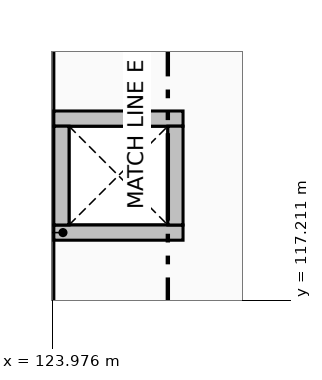
"""IFC4 building model, lengths in metres.
Left out: names, types, materials, properties, quantities, classifications, styles, units other than length and angle.
Written with IfcOpenShell. Run it as: python <this file> out.ifc"""

import sys

from ifc_helpers import new_model, si_unit, direction, frame, frame_2d, origin, place, context, subcontext, project, spatial, rectangle, extrude, element, save


model = new_model("IFC4")
c1 = context("Model", 3, precision=1e-05, world=origin(), true_north=direction((0.0, 1.0)))
c2 = subcontext(c1, "Body", "Model", "MODEL_VIEW")
j1 = project(units=[si_unit("LENGTHUNIT", "METRE"), si_unit("PLANEANGLEUNIT", "RADIAN")], contexts=[c1])
p1 = place(None, origin())
s1 = spatial("IfcSite", under=j1, at=p1, CompositionType="ELEMENT")
p2 = place(p1, origin())
s2 = spatial("IfcBuilding", under=s1, at=p2, CompositionType="ELEMENT")
p3 = place(p2, origin())
s3 = spatial("IfcBuildingStorey", under=s2, at=p3, CompositionType="ELEMENT", Elevation=0.0)
for number, where, z_axis, x_axis in (
    (1, (124.0, 118.1, 0.0), (0.0, 0.0, 1.0), (1.0, 0.0, 0.0)),
    (2, (125.7, 119.6, 0.0), (0.0, 0.0, 1.0), (-1.0, 0.0, 0.0)),
):
    element("IfcWall", number, at=place(p3, frame(where, z_axis=z_axis, x_axis=x_axis)), inside=s3, PredefinedType="PARTITIONING", context=c2, shape_type="SweptSolid", body=[
        extrude(rectangle(XDim=1.7, YDim=0.2, at=frame_2d((0.85, 0.0))), origin(), (0.0, 0.0, 1.0), 5.1),
    ])
for number, where, z_axis, x_axis in (
    (3, (124.1, 118.2, 0.0), (0.0, 0.0, 1.0), (0.0, 1.0, 0.0)),
    (4, (125.6, 119.5, 0.0), (0.0, 0.0, 1.0), (0.0, -1.0, 0.0)),
):
    element("IfcWall", number, at=place(p3, frame(where, z_axis=z_axis, x_axis=x_axis)), inside=s3, PredefinedType="PARTITIONING", context=c2, shape_type="SweptSolid", body=[
        extrude(rectangle(XDim=1.3, YDim=0.2, at=frame_2d((0.65, 0.0))), origin(), (0.0, 0.0, 1.0), 5.1),
    ])
save(model, sys.argv[1])
